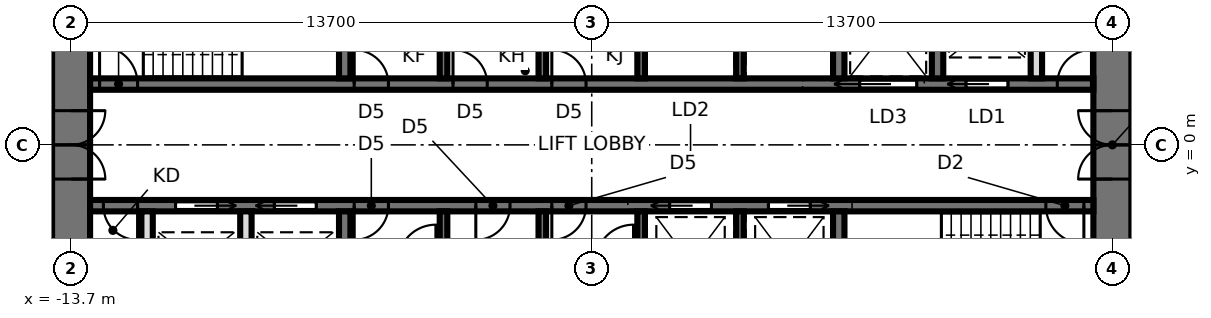
"""IFC4 building model, lengths in metres.
Left out: names, types, materials, properties, quantities, classifications, styles, units other than length and angle.
Written with IfcOpenShell. Run it as: python <this file> out.ifc"""

import sys

from ifc_helpers import new_model, si_unit, direction, frame, frame_2d, origin, place, context, subcontext, project, spatial, rectangle, extrude, element, fill, save


model = new_model("IFC4")
c1 = context("Model", 3, precision=1e-05, world=origin(), true_north=direction((0.0, 1.0)))
c2 = subcontext(c1, "Body", "Model", "MODEL_VIEW")
j1 = project(units=[si_unit("LENGTHUNIT", "METRE"), si_unit("PLANEANGLEUNIT", "RADIAN")], contexts=[c1])
p1 = place(None, origin())
s1 = spatial("IfcSite", under=j1, at=p1, CompositionType="ELEMENT")
p2 = place(p1, origin())
s2 = spatial("IfcBuilding", under=s1, at=p2, CompositionType="ELEMENT")
p3 = place(p2, frame((0.0, 0.0, 226.7)))
s3 = spatial("IfcBuildingStorey", under=s2, at=p3, CompositionType="ELEMENT", Elevation=226.7)
p4 = place(p3, frame((13.7, -9.5, 0.0), z_axis=(0.0, 0.0, 1.0), x_axis=(0.0, 1.0, 0.0)))
e1 = element("IfcWall", 1, at=p4, inside=s3, PredefinedType="SHEAR", context=c2, shape_type="SweptSolid", body=[
    extrude(rectangle(XDim=19.0, YDim=1.0, at=frame_2d((9.5, 0.0))), origin(), (0.0, 0.0, 1.0), 3.9),
])
p5 = place(p4, frame((8.6, 0.0, 0.0)))
e2 = element("IfcOpeningElement", 2, at=p5, cuts=e1, PredefinedType="OPENING", context=c2, shape_type="SweptSolid", body=[
    extrude(rectangle(XDim=1.8, YDim=2.4, at=frame_2d((0.9, 1.2))), frame((0.0, 0.51, 0.0), z_axis=(0.0, -1.0, 0.0), x_axis=(1.0, 0.0, 0.0)), (0.0, 0.0, 1.0), 1.02),
])
p6 = place(p3, frame((-13.7, 9.5, 0.0), z_axis=(0.0, 0.0, 1.0), x_axis=(0.0, -1.0, 0.0)))
e3 = element("IfcWall", 3, at=p6, inside=s3, PredefinedType="SHEAR", context=c2, shape_type="SweptSolid", body=[
    extrude(rectangle(XDim=19.0, YDim=1.0, at=frame_2d((9.5, 0.0))), origin(), (0.0, 0.0, 1.0), 3.9),
])
p7 = place(p6, frame((8.6, 0.0, 0.0)))
e4 = element("IfcOpeningElement", 4, at=p7, cuts=e3, PredefinedType="OPENING", context=c2, shape_type="SweptSolid", body=[
    extrude(rectangle(XDim=1.8, YDim=2.4, at=frame_2d((0.9, 1.2))), frame((0.0, 0.51, 0.0), z_axis=(0.0, -1.0, 0.0), x_axis=(1.0, 0.0, 0.0)), (0.0, 0.0, 1.0), 1.02),
])
p8 = place(p3, frame((-13.2, 1.6, 0.0), z_axis=(0.0, 0.0, 1.0), x_axis=(1.0, 0.0, 0.0)))
e5 = element("IfcWall", 5, at=p8, inside=s3, PredefinedType="SHEAR", context=c2, shape_type="SweptSolid", body=[
    extrude(rectangle(XDim=26.4, YDim=0.3, at=frame_2d((13.2, 0.0))), origin(), (0.0, 0.0, 1.0), 3.9),
])
p9 = place(p8, frame((0.25, 0.0, 0.0)))
e6 = element("IfcOpeningElement", 6, at=p9, cuts=e5, PredefinedType="OPENING", context=c2, shape_type="SweptSolid", body=[
    extrude(rectangle(XDim=1.0, YDim=2.1, at=frame_2d((0.5, 1.05))), frame((0.0, 0.16, 0.0), z_axis=(0.0, -1.0, 0.0), x_axis=(1.0, 0.0, 0.0)), (0.0, 0.0, 1.0), 0.32),
])
p10 = place(p8, frame((23.05, 0.0, 0.0)))
e7 = element("IfcOpeningElement", 7, at=p10, cuts=e5, PredefinedType="OPENING", context=c2, shape_type="SweptSolid", body=[
    extrude(rectangle(XDim=1.1, YDim=2.3, at=frame_2d((0.55, 1.15))), frame((0.0, 0.16, 0.0), z_axis=(0.0, -1.0, 0.0), x_axis=(1.0, 0.0, 0.0)), (0.0, 0.0, 1.0), 0.32),
])
p11 = place(p8, frame((20.25, 0.0, 0.0)))
e8 = element("IfcOpeningElement", 8, at=p11, cuts=e5, PredefinedType="OPENING", context=c2, shape_type="SweptSolid", body=[
    extrude(rectangle(XDim=1.5, YDim=2.4, at=frame_2d((0.75, 1.2))), frame((0.0, 0.16, 0.0), z_axis=(0.0, -1.0, 0.0), x_axis=(1.0, 0.0, 0.0)), (0.0, 0.0, 1.0), 0.32),
])
p12 = place(p8, frame((6.95, 0.0, 0.0)))
e9 = element("IfcOpeningElement", 9, at=p12, cuts=e5, PredefinedType="OPENING", context=c2, shape_type="SweptSolid", body=[
    extrude(rectangle(XDim=0.9, YDim=2.1, at=frame_2d((0.45, 1.05))), frame((0.0, 0.16, 0.0), z_axis=(0.0, -1.0, 0.0), x_axis=(1.0, 0.0, 0.0)), (0.0, 0.0, 1.0), 0.32),
])
p13 = place(p8, frame((9.55, 0.0, 0.0)))
e10 = element("IfcOpeningElement", 10, at=p13, cuts=e5, PredefinedType="OPENING", context=c2, shape_type="SweptSolid", body=[
    extrude(rectangle(XDim=0.9, YDim=2.1, at=frame_2d((0.45, 1.05))), frame((0.0, 0.16, 0.0), z_axis=(0.0, -1.0, 0.0), x_axis=(1.0, 0.0, 0.0)), (0.0, 0.0, 1.0), 0.32),
])
p14 = place(p8, frame((12.15, 0.0, 0.0)))
e11 = element("IfcOpeningElement", 11, at=p14, cuts=e5, PredefinedType="OPENING", context=c2, shape_type="SweptSolid", body=[
    extrude(rectangle(XDim=0.9, YDim=2.1, at=frame_2d((0.45, 1.05))), frame((0.0, 0.16, 0.0), z_axis=(0.0, -1.0, 0.0), x_axis=(1.0, 0.0, 0.0)), (0.0, 0.0, 1.0), 0.32),
])
p15 = place(p8, frame((25.45, 0.0, 0.0)))
e12 = element("IfcOpeningElement", 12, at=p15, cuts=e5, PredefinedType="OPENING", context=c2, shape_type="SweptSolid", body=[
    extrude(rectangle(XDim=0.9, YDim=2.1, at=frame_2d((0.45, 1.05))), frame((0.0, 0.16, 0.0), z_axis=(0.0, -1.0, 0.0), x_axis=(1.0, 0.0, 0.0)), (0.0, 0.0, 1.0), 0.32),
])
p16 = place(p3, frame((-13.2, -1.6, 0.0), z_axis=(0.0, 0.0, 1.0), x_axis=(1.0, 0.0, 0.0)))
e13 = element("IfcWall", 13, at=p16, inside=s3, PredefinedType="SHEAR", context=c2, shape_type="SweptSolid", body=[
    extrude(rectangle(XDim=26.4, YDim=0.3, at=frame_2d((13.2, 0.0))), origin(), (0.0, 0.0, 1.0), 3.9),
])
p17 = place(p16, frame((25.15, 0.0, 0.0)))
e14 = element("IfcOpeningElement", 14, at=p17, cuts=e13, PredefinedType="OPENING", context=c2, shape_type="SweptSolid", body=[
    extrude(rectangle(XDim=1.0, YDim=2.1, at=frame_2d((0.5, 1.05))), frame((0.0, 0.16, 0.0), z_axis=(0.0, -1.0, 0.0), x_axis=(1.0, 0.0, 0.0)), (0.0, 0.0, 1.0), 0.32),
])
p18 = place(p16, frame((6.95, 0.0, 0.0)))
e15 = element("IfcOpeningElement", 15, at=p18, cuts=e13, PredefinedType="OPENING", context=c2, shape_type="SweptSolid", body=[
    extrude(rectangle(XDim=0.9, YDim=2.1, at=frame_2d((0.45, 1.05))), frame((0.0, 0.16, 0.0), z_axis=(0.0, -1.0, 0.0), x_axis=(1.0, 0.0, 0.0)), (0.0, 0.0, 1.0), 0.32),
])
p19 = place(p16, frame((10.15, 0.0, 0.0)))
e16 = element("IfcOpeningElement", 16, at=p19, cuts=e13, PredefinedType="OPENING", context=c2, shape_type="SweptSolid", body=[
    extrude(rectangle(XDim=0.9, YDim=2.1, at=frame_2d((0.45, 1.05))), frame((0.0, 0.16, 0.0), z_axis=(0.0, -1.0, 0.0), x_axis=(1.0, 0.0, 0.0)), (0.0, 0.0, 1.0), 0.32),
])
p20 = place(p16, frame((12.15, 0.0, 0.0)))
e17 = element("IfcOpeningElement", 17, at=p20, cuts=e13, PredefinedType="OPENING", context=c2, shape_type="SweptSolid", body=[
    extrude(rectangle(XDim=0.9, YDim=2.1, at=frame_2d((0.45, 1.05))), frame((0.0, 0.16, 0.0), z_axis=(0.0, -1.0, 0.0), x_axis=(1.0, 0.0, 0.0)), (0.0, 0.0, 1.0), 0.32),
])
p21 = place(p16, frame((15.25, 0.0, 0.0)))
e18 = element("IfcOpeningElement", 18, at=p21, cuts=e13, PredefinedType="OPENING", context=c2, shape_type="SweptSolid", body=[
    extrude(rectangle(XDim=1.1, YDim=2.3, at=frame_2d((0.55, 1.15))), frame((0.0, 0.16, 0.0), z_axis=(0.0, -1.0, 0.0), x_axis=(1.0, 0.0, 0.0)), (0.0, 0.0, 1.0), 0.32),
])
p22 = place(p16, frame((17.85, 0.0, 0.0)))
e19 = element("IfcOpeningElement", 19, at=p22, cuts=e13, PredefinedType="OPENING", context=c2, shape_type="SweptSolid", body=[
    extrude(rectangle(XDim=1.1, YDim=2.3, at=frame_2d((0.55, 1.15))), frame((0.0, 0.16, 0.0), z_axis=(0.0, -1.0, 0.0), x_axis=(1.0, 0.0, 0.0)), (0.0, 0.0, 1.0), 0.32),
])
p23 = place(p16, frame((4.85, 0.0, 0.0)))
e20 = element("IfcOpeningElement", 20, at=p23, cuts=e13, PredefinedType="OPENING", context=c2, shape_type="SweptSolid", body=[
    extrude(rectangle(XDim=1.1, YDim=2.3, at=frame_2d((0.55, 1.15))), frame((0.0, 0.16, 0.0), z_axis=(0.0, -1.0, 0.0), x_axis=(1.0, 0.0, 0.0)), (0.0, 0.0, 1.0), 0.32),
])
p24 = place(p16, frame((2.25, 0.0, 0.0)))
e21 = element("IfcOpeningElement", 21, at=p24, cuts=e13, PredefinedType="OPENING", context=c2, shape_type="SweptSolid", body=[
    extrude(rectangle(XDim=1.1, YDim=2.3, at=frame_2d((0.55, 1.15))), frame((0.0, 0.16, 0.0), z_axis=(0.0, -1.0, 0.0), x_axis=(1.0, 0.0, 0.0)), (0.0, 0.0, 1.0), 0.32),
])
p25 = place(p16, frame((0.35, 0.0, 0.0)))
e22 = element("IfcOpeningElement", 22, at=p25, cuts=e13, PredefinedType="OPENING", context=c2, shape_type="SweptSolid", body=[
    extrude(rectangle(XDim=0.9, YDim=2.1, at=frame_2d((0.45, 1.05))), frame((0.0, 0.16, 0.0), z_axis=(0.0, -1.0, 0.0), x_axis=(1.0, 0.0, 0.0)), (0.0, 0.0, 1.0), 0.32),
])
for number, where, z_axis, x_axis in (
    (23, (-6.5, 1.75, 0.0), (0.0, 0.0, 1.0), (0.0, 1.0, 0.0)),
    (24, (6.5, 1.75, 0.0), (0.0, 0.0, 1.0), (0.0, 1.0, 0.0)),
):
    element("IfcWall", number, at=place(p3, frame(where, z_axis=z_axis, x_axis=x_axis)), inside=s3, PredefinedType="SHEAR", context=c2, shape_type="SweptSolid", body=[
        extrude(rectangle(XDim=2.7, YDim=0.3, at=frame_2d((1.35, 0.0))), origin(), (0.0, 0.0, 1.0), 3.9),
    ])
for number, where, z_axis, x_axis in (
    (25, (-3.9, 1.75, 0.0), (0.0, 0.0, 1.0), (0.0, 1.0, 0.0)),
    (26, (-1.3, 1.75, 0.0), (0.0, 0.0, 1.0), (0.0, 1.0, 0.0)),
    (27, (1.3, 1.75, 0.0), (0.0, 0.0, 1.0), (0.0, 1.0, 0.0)),
    (28, (3.9, 1.75, 0.0), (0.0, 0.0, 1.0), (0.0, 1.0, 0.0)),
):
    element("IfcWall", number, at=place(p3, frame(where, z_axis=z_axis, x_axis=x_axis)), inside=s3, PredefinedType="SHEAR", context=c2, shape_type="SweptSolid", body=[
        extrude(rectangle(XDim=2.7, YDim=0.2, at=frame_2d((1.35, 0.0))), origin(), (0.0, 0.0, 1.0), 3.9),
    ])
for number, where, z_axis, x_axis in (
    (29, (-6.5, -1.75, 0.0), (0.0, 0.0, 1.0), (0.0, -1.0, 0.0)),
    (30, (6.5, -1.75, 0.0), (0.0, 0.0, 1.0), (0.0, -1.0, 0.0)),
):
    element("IfcWall", number, at=place(p3, frame(where, z_axis=z_axis, x_axis=x_axis)), inside=s3, PredefinedType="SHEAR", context=c2, shape_type="SweptSolid", body=[
        extrude(rectangle(XDim=2.7, YDim=0.3, at=frame_2d((1.35, 0.0))), origin(), (0.0, 0.0, 1.0), 3.9),
    ])
for number, where, z_axis, x_axis in (
    (31, (-3.9, -1.75, 0.0), (0.0, 0.0, 1.0), (0.0, -1.0, 0.0)),
    (32, (-1.3, -1.75, 0.0), (0.0, 0.0, 1.0), (0.0, -1.0, 0.0)),
    (33, (1.3, -1.75, 0.0), (0.0, 0.0, 1.0), (0.0, -1.0, 0.0)),
    (34, (3.9, -1.75, 0.0), (0.0, 0.0, 1.0), (0.0, -1.0, 0.0)),
):
    element("IfcWall", number, at=place(p3, frame(where, z_axis=z_axis, x_axis=x_axis)), inside=s3, PredefinedType="SHEAR", context=c2, shape_type="SweptSolid", body=[
        extrude(rectangle(XDim=2.7, YDim=0.2, at=frame_2d((1.35, 0.0))), origin(), (0.0, 0.0, 1.0), 3.9),
    ])
p26 = place(p3, frame((9.1, 1.75, 0.0), z_axis=(0.0, 0.0, 1.0), x_axis=(0.0, 1.0, 0.0)))
e35 = element("IfcWall", 35, at=p26, inside=s3, PredefinedType="SHEAR", context=c2, shape_type="SweptSolid", body=[
    extrude(rectangle(XDim=2.7, YDim=0.3, at=frame_2d((1.35, 0.0))), origin(), (0.0, 0.0, 1.0), 3.9),
])
for number, where, z_axis, x_axis in (
    (36, (-9.1, -1.75, 0.0), (0.0, 0.0, 1.0), (0.0, -1.0, 0.0)),
    (37, (-11.7, -1.75, 0.0), (0.0, 0.0, 1.0), (0.0, -1.0, 0.0)),
    (38, (11.7, 1.75, 0.0), (0.0, 0.0, 1.0), (0.0, 1.0, 0.0)),
):
    element("IfcWall", number, at=place(p3, frame(where, z_axis=z_axis, x_axis=x_axis)), inside=s3, PredefinedType="SOLIDWALL", context=c2, shape_type="SweptSolid", body=[
        extrude(rectangle(XDim=2.7, YDim=0.3, at=frame_2d((1.35, 0.0))), origin(), (0.0, 0.0, 1.0), 3.74),
    ])
p27 = place(p7, origin())
e39 = element("IfcDoor", 39, at=p27, inside=s3, OperationType="DOUBLE_DOOR_SINGLE_SWING", PredefinedType="DOOR", context=c2, shape_type="SweptSolid", body=[
    extrude(rectangle(XDim=1.72, YDim=2.36, at=frame_2d((0.9, 1.18))), frame((0.0, 0.025, 0.0), z_axis=(0.0, -1.0, 0.0), x_axis=(1.0, 0.0, 0.0)), (0.0, 0.0, 1.0), 0.05),
    extrude(rectangle(XDim=0.04, YDim=2.4, at=frame_2d((0.02, 1.2))), frame((0.0, 0.25, 0.0), z_axis=(0.0, -1.0, 0.0), x_axis=(1.0, 0.0, 0.0)), (0.0, 0.0, 1.0), 0.5),
    extrude(rectangle(XDim=0.04, YDim=2.4, at=frame_2d((1.78, 1.2))), frame((0.0, 0.25, 0.0), z_axis=(0.0, -1.0, 0.0), x_axis=(1.0, 0.0, 0.0)), (0.0, 0.0, 1.0), 0.5),
    extrude(rectangle(XDim=1.72, YDim=0.04, at=frame_2d((0.9, 2.38))), frame((0.0, 0.25, 0.0), z_axis=(0.0, -1.0, 0.0), x_axis=(1.0, 0.0, 0.0)), (0.0, 0.0, 1.0), 0.5),
])
fill(e4, e39)
p28 = place(p5, origin())
e40 = element("IfcDoor", 40, at=p28, inside=s3, OperationType="DOUBLE_DOOR_SINGLE_SWING", PredefinedType="DOOR", context=c2, shape_type="SweptSolid", body=[
    extrude(rectangle(XDim=1.72, YDim=2.36, at=frame_2d((0.9, 1.18))), frame((0.0, 0.025, 0.0), z_axis=(0.0, -1.0, 0.0), x_axis=(1.0, 0.0, 0.0)), (0.0, 0.0, 1.0), 0.05),
    extrude(rectangle(XDim=0.04, YDim=2.4, at=frame_2d((0.02, 1.2))), frame((0.0, 0.25, 0.0), z_axis=(0.0, -1.0, 0.0), x_axis=(1.0, 0.0, 0.0)), (0.0, 0.0, 1.0), 0.5),
    extrude(rectangle(XDim=0.04, YDim=2.4, at=frame_2d((1.78, 1.2))), frame((0.0, 0.25, 0.0), z_axis=(0.0, -1.0, 0.0), x_axis=(1.0, 0.0, 0.0)), (0.0, 0.0, 1.0), 0.5),
    extrude(rectangle(XDim=1.72, YDim=0.04, at=frame_2d((0.9, 2.38))), frame((0.0, 0.25, 0.0), z_axis=(0.0, -1.0, 0.0), x_axis=(1.0, 0.0, 0.0)), (0.0, 0.0, 1.0), 0.5),
])
fill(e2, e40)
p29 = place(p9, origin())
e41 = element("IfcDoor", 41, at=p29, inside=s3, OperationType="SINGLE_SWING_LEFT", PredefinedType="DOOR", context=c2, shape_type="SweptSolid", body=[
    extrude(rectangle(XDim=1.0, YDim=2.1, at=frame_2d((0.5, 1.05))), frame((0.0, 0.025, 0.0), z_axis=(0.0, -1.0, 0.0), x_axis=(1.0, 0.0, 0.0)), (0.0, 0.0, 1.0), 0.05),
])
fill(e6, e41)
p30 = place(p17, frame((1.0, 0.0, 0.0), z_axis=(0.0, 0.0, 1.0), x_axis=(-1.0, 0.0, 0.0)))
e42 = element("IfcDoor", 42, at=p30, inside=s3, OperationType="SINGLE_SWING_LEFT", PredefinedType="DOOR", context=c2, shape_type="SweptSolid", body=[
    extrude(rectangle(XDim=1.0, YDim=2.1, at=frame_2d((0.5, 1.05))), frame((0.0, 0.025, 0.0), z_axis=(0.0, -1.0, 0.0), x_axis=(1.0, 0.0, 0.0)), (0.0, 0.0, 1.0), 0.05),
])
fill(e14, e42)
p31 = place(p10, origin())
e43 = element("IfcDoor", 43, at=p31, inside=s3, OperationType="SLIDING_TO_LEFT", PredefinedType="DOOR", context=c2, shape_type="SweptSolid", body=[
    extrude(rectangle(XDim=1.1, YDim=2.3, at=frame_2d((0.55, 1.15))), frame((0.0, 0.025, 0.0), z_axis=(0.0, -1.0, 0.0), x_axis=(1.0, 0.0, 0.0)), (0.0, 0.0, 1.0), 0.05),
])
fill(e7, e43)
p32 = place(p11, origin())
e44 = element("IfcDoor", 44, at=p32, inside=s3, OperationType="SLIDING_TO_LEFT", PredefinedType="DOOR", context=c2, shape_type="SweptSolid", body=[
    extrude(rectangle(XDim=1.5, YDim=2.4, at=frame_2d((0.75, 1.2))), frame((0.0, 0.025, 0.0), z_axis=(0.0, -1.0, 0.0), x_axis=(1.0, 0.0, 0.0)), (0.0, 0.0, 1.0), 0.05),
])
fill(e8, e44)
p33 = place(p12, origin())
e45 = element("IfcDoor", 45, at=p33, inside=s3, OperationType="SINGLE_SWING_LEFT", PredefinedType="DOOR", context=c2, shape_type="SweptSolid", body=[
    extrude(rectangle(XDim=0.9, YDim=2.1, at=frame_2d((0.45, 1.05))), frame((0.0, 0.025, 0.0), z_axis=(0.0, -1.0, 0.0), x_axis=(1.0, 0.0, 0.0)), (0.0, 0.0, 1.0), 0.05),
])
fill(e9, e45)
p34 = place(p13, origin())
e46 = element("IfcDoor", 46, at=p34, inside=s3, OperationType="SINGLE_SWING_LEFT", PredefinedType="DOOR", context=c2, shape_type="SweptSolid", body=[
    extrude(rectangle(XDim=0.9, YDim=2.1, at=frame_2d((0.45, 1.05))), frame((0.0, 0.025, 0.0), z_axis=(0.0, -1.0, 0.0), x_axis=(1.0, 0.0, 0.0)), (0.0, 0.0, 1.0), 0.05),
])
fill(e10, e46)
p35 = place(p14, origin())
e47 = element("IfcDoor", 47, at=p35, inside=s3, OperationType="SINGLE_SWING_LEFT", PredefinedType="DOOR", context=c2, shape_type="SweptSolid", body=[
    extrude(rectangle(XDim=0.9, YDim=2.1, at=frame_2d((0.45, 1.05))), frame((0.0, 0.025, 0.0), z_axis=(0.0, -1.0, 0.0), x_axis=(1.0, 0.0, 0.0)), (0.0, 0.0, 1.0), 0.05),
])
fill(e11, e47)
p36 = place(p18, frame((0.9, 0.0, 0.0), z_axis=(0.0, 0.0, 1.0), x_axis=(-1.0, 0.0, 0.0)))
e48 = element("IfcDoor", 48, at=p36, inside=s3, OperationType="SINGLE_SWING_RIGHT", PredefinedType="DOOR", context=c2, shape_type="SweptSolid", body=[
    extrude(rectangle(XDim=0.9, YDim=2.1, at=frame_2d((0.45, 1.05))), frame((0.0, 0.025, 0.0), z_axis=(0.0, -1.0, 0.0), x_axis=(1.0, 0.0, 0.0)), (0.0, 0.0, 1.0), 0.05),
])
fill(e15, e48)
p37 = place(p19, frame((0.9, 0.0, 0.0), z_axis=(0.0, 0.0, 1.0), x_axis=(-1.0, 0.0, 0.0)))
e49 = element("IfcDoor", 49, at=p37, inside=s3, OperationType="SINGLE_SWING_RIGHT", PredefinedType="DOOR", context=c2, shape_type="SweptSolid", body=[
    extrude(rectangle(XDim=0.9, YDim=2.1, at=frame_2d((0.45, 1.05))), frame((0.0, 0.025, 0.0), z_axis=(0.0, -1.0, 0.0), x_axis=(1.0, 0.0, 0.0)), (0.0, 0.0, 1.0), 0.05),
])
fill(e16, e49)
p38 = place(p20, frame((0.9, 0.0, 0.0), z_axis=(0.0, 0.0, 1.0), x_axis=(-1.0, 0.0, 0.0)))
e50 = element("IfcDoor", 50, at=p38, inside=s3, OperationType="SINGLE_SWING_RIGHT", PredefinedType="DOOR", context=c2, shape_type="SweptSolid", body=[
    extrude(rectangle(XDim=0.9, YDim=2.1, at=frame_2d((0.45, 1.05))), frame((0.0, 0.025, 0.0), z_axis=(0.0, -1.0, 0.0), x_axis=(1.0, 0.0, 0.0)), (0.0, 0.0, 1.0), 0.05),
])
fill(e17, e50)
p39 = place(p21, frame((1.1, 0.0, 0.0), z_axis=(0.0, 0.0, 1.0), x_axis=(-1.0, 0.0, 0.0)))
e51 = element("IfcDoor", 51, at=p39, inside=s3, OperationType="SLIDING_TO_RIGHT", PredefinedType="DOOR", context=c2, shape_type="SweptSolid", body=[
    extrude(rectangle(XDim=1.1, YDim=2.3, at=frame_2d((0.55, 1.15))), frame((0.0, 0.025, 0.0), z_axis=(0.0, -1.0, 0.0), x_axis=(1.0, 0.0, 0.0)), (0.0, 0.0, 1.0), 0.05),
])
fill(e18, e51)
p40 = place(p22, frame((1.1, 0.0, 0.0), z_axis=(0.0, 0.0, 1.0), x_axis=(-1.0, 0.0, 0.0)))
e52 = element("IfcDoor", 52, at=p40, inside=s3, OperationType="SLIDING_TO_LEFT", PredefinedType="DOOR", context=c2, shape_type="SweptSolid", body=[
    extrude(rectangle(XDim=1.1, YDim=2.3, at=frame_2d((0.55, 1.15))), frame((0.0, 0.025, 0.0), z_axis=(0.0, -1.0, 0.0), x_axis=(1.0, 0.0, 0.0)), (0.0, 0.0, 1.0), 0.05),
])
fill(e19, e52)
p41 = place(p23, frame((1.1, 0.0, 0.0), z_axis=(0.0, 0.0, 1.0), x_axis=(-1.0, 0.0, 0.0)))
e53 = element("IfcDoor", 53, at=p41, inside=s3, OperationType="SLIDING_TO_RIGHT", PredefinedType="DOOR", context=c2, shape_type="SweptSolid", body=[
    extrude(rectangle(XDim=1.1, YDim=2.3, at=frame_2d((0.55, 1.15))), frame((0.0, 0.025, 0.0), z_axis=(0.0, -1.0, 0.0), x_axis=(1.0, 0.0, 0.0)), (0.0, 0.0, 1.0), 0.05),
])
fill(e20, e53)
p42 = place(p24, frame((1.1, 0.0, 0.0), z_axis=(0.0, 0.0, 1.0), x_axis=(-1.0, 0.0, 0.0)))
e54 = element("IfcDoor", 54, at=p42, inside=s3, OperationType="SLIDING_TO_LEFT", PredefinedType="DOOR", context=c2, shape_type="SweptSolid", body=[
    extrude(rectangle(XDim=1.1, YDim=2.3, at=frame_2d((0.55, 1.15))), frame((0.0, 0.025, 0.0), z_axis=(0.0, -1.0, 0.0), x_axis=(1.0, 0.0, 0.0)), (0.0, 0.0, 1.0), 0.05),
])
fill(e21, e54)
p43 = place(p15, origin())
e55 = element("IfcDoor", 55, at=p43, inside=s3, OperationType="SINGLE_SWING_RIGHT", PredefinedType="DOOR", context=c2, shape_type="SweptSolid", body=[
    extrude(rectangle(XDim=0.9, YDim=2.1, at=frame_2d((0.45, 1.05))), frame((0.0, 0.025, 0.0), z_axis=(0.0, -1.0, 0.0), x_axis=(1.0, 0.0, 0.0)), (0.0, 0.0, 1.0), 0.05),
])
fill(e12, e55)
p44 = place(p25, frame((0.9, 0.0, 0.0), z_axis=(0.0, 0.0, 1.0), x_axis=(-1.0, 0.0, 0.0)))
e56 = element("IfcDoor", 56, at=p44, inside=s3, OperationType="SINGLE_SWING_LEFT", PredefinedType="DOOR", context=c2, shape_type="SweptSolid", body=[
    extrude(rectangle(XDim=0.9, YDim=2.1, at=frame_2d((0.45, 1.05))), frame((0.0, 0.025, 0.0), z_axis=(0.0, -1.0, 0.0), x_axis=(1.0, 0.0, 0.0)), (0.0, 0.0, 1.0), 0.05),
])
fill(e22, e56)
save(model, sys.argv[1])
